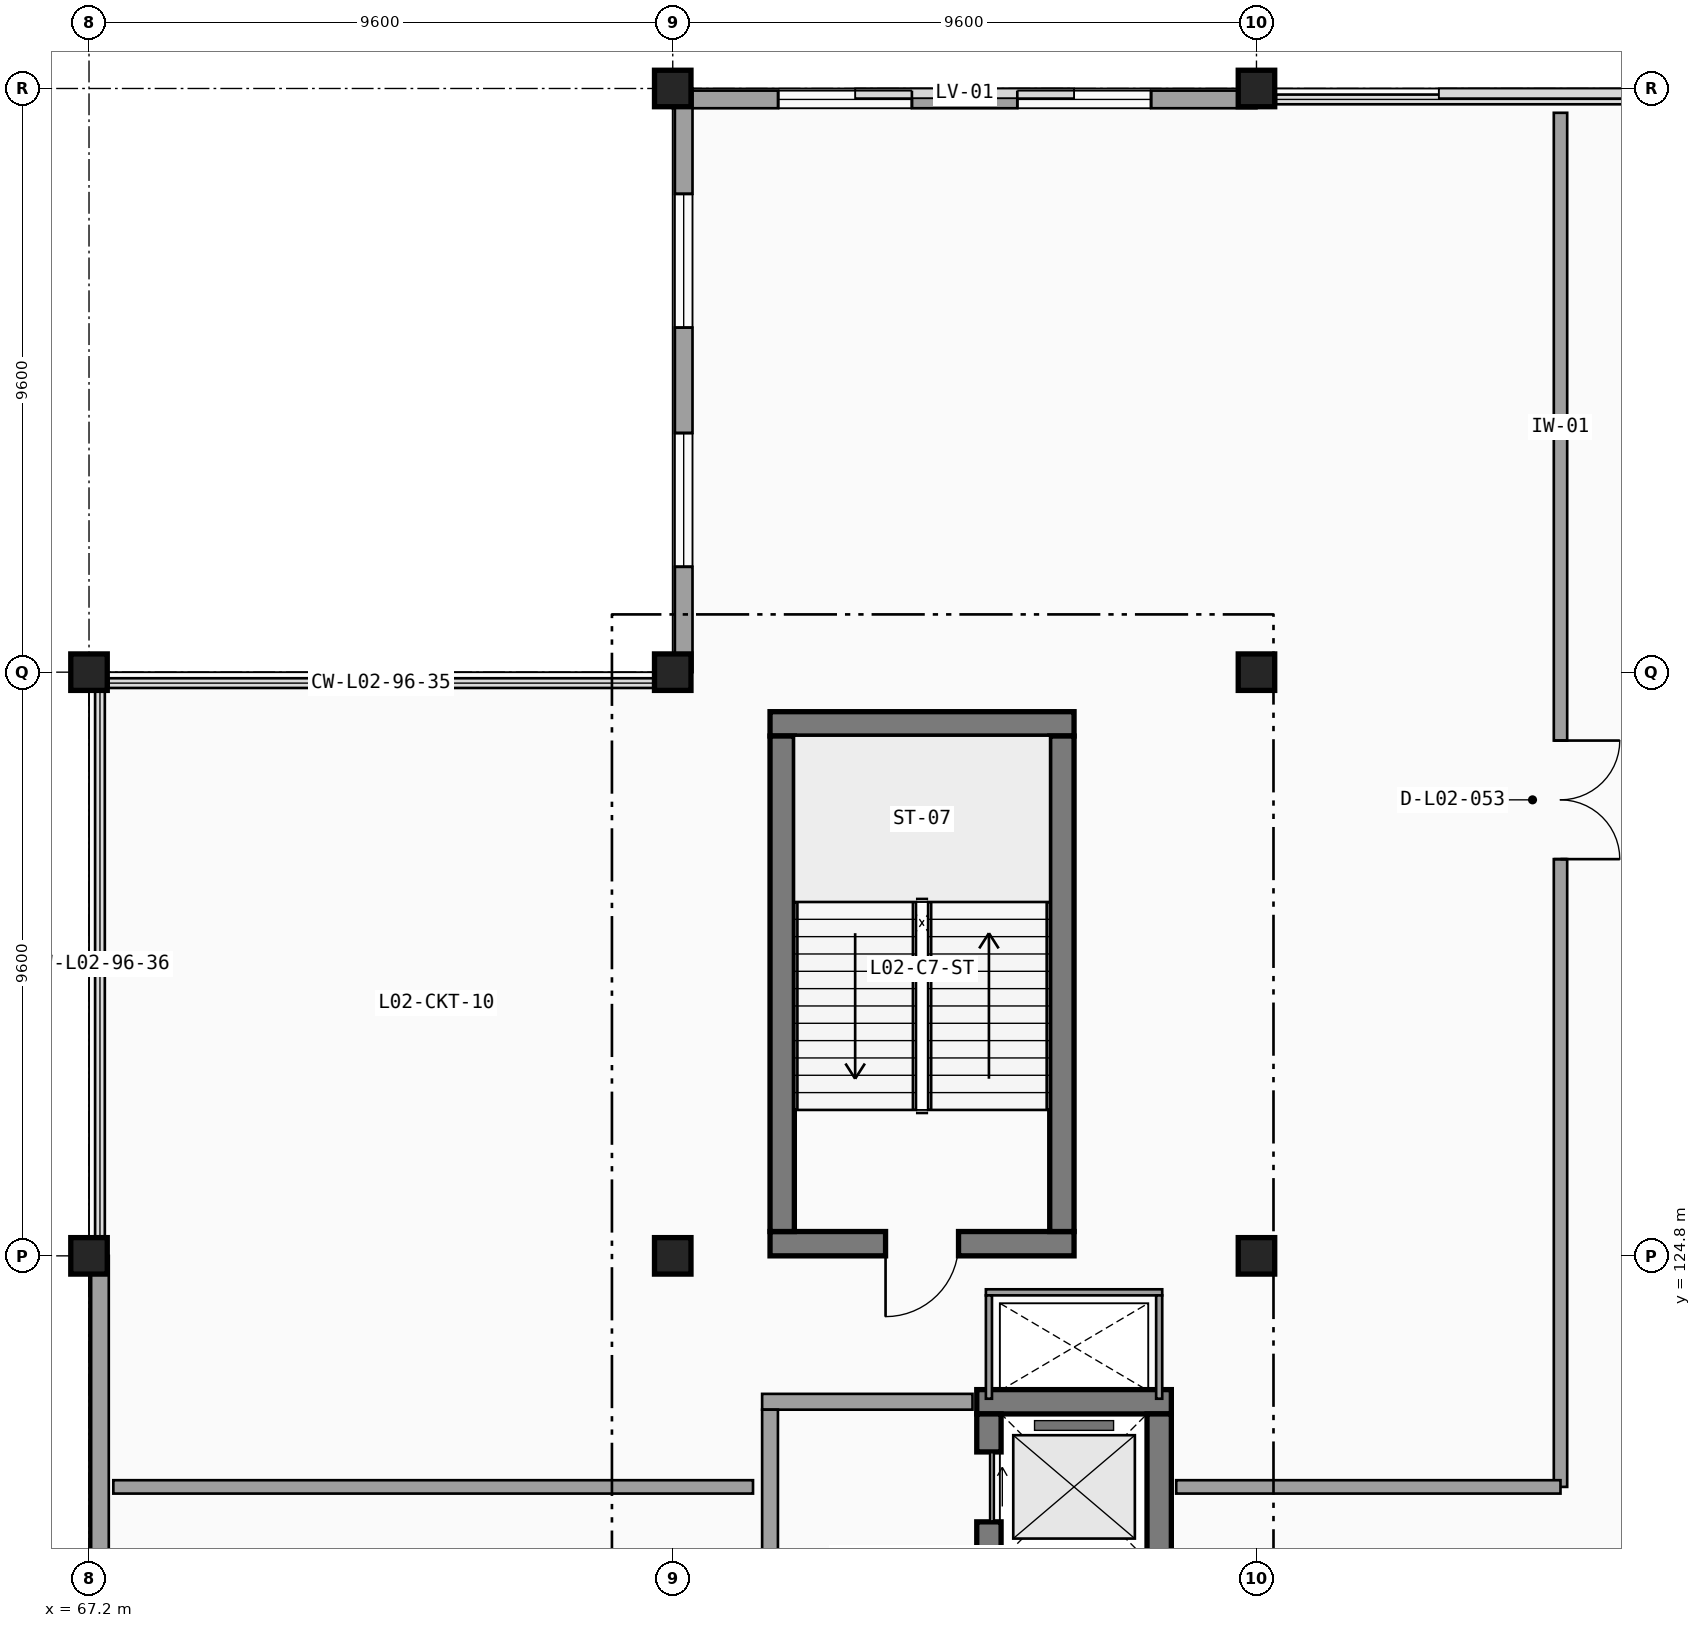
"""IFC4 building model, lengths in metres.
Left out: names, types, materials, properties, quantities, classifications, styles, units other than length and angle.
Written with IfcOpenShell. Run it as: python <this file> out.ifc"""

import sys

from ifc_helpers import new_model, si_unit, direction, frame, frame_2d, origin, origin_2d, place, context, subcontext, project, spatial, rectangle, extrude, element, fill, save


model = new_model("IFC4")
c1 = context("Model", 3, precision=1e-05, world=origin(), true_north=direction((0.0, 1.0)))
c2 = subcontext(c1, "Body", "Model", "MODEL_VIEW")
j1 = project(units=[si_unit("LENGTHUNIT", "METRE"), si_unit("PLANEANGLEUNIT", "RADIAN")], contexts=[c1])
p1 = place(None, origin())
s1 = spatial("IfcSite", under=j1, at=p1, CompositionType="ELEMENT")
p2 = place(p1, origin())
s2 = spatial("IfcBuilding", under=s1, at=p2, CompositionType="ELEMENT")
p3 = place(p2, frame((0.0, 0.0, 9.6)))
s3 = spatial("IfcBuildingStorey", under=s2, at=p3, CompositionType="ELEMENT", Elevation=9.6)
for number, where, z_axis, x_axis in (
    (1, (67.2, 124.8, 0.0), (0.0, 0.0, 1.0), (1.0, 0.0, 0.0)),
    (2, (67.2, 134.4, 0.0), (0.0, 0.0, 1.0), (1.0, 0.0, 0.0)),
    (3, (76.8, 124.8, 0.0), (0.0, 0.0, 1.0), (1.0, 0.0, 0.0)),
    (4, (76.8, 134.4, 0.0), (0.0, 0.0, 1.0), (1.0, 0.0, 0.0)),
    (5, (76.8, 144.0, 0.0), (0.0, 0.0, 1.0), (1.0, 0.0, 0.0)),
    (6, (86.4, 124.8, 0.0), (0.0, 0.0, 1.0), (1.0, 0.0, 0.0)),
    (7, (86.4, 134.4, 0.0), (0.0, 0.0, 1.0), (1.0, 0.0, 0.0)),
    (8, (86.4, 144.0, 0.0), (0.0, 0.0, 1.0), (1.0, 0.0, 0.0)),
):
    element("IfcColumn", number, at=place(p3, frame(where, z_axis=z_axis, x_axis=x_axis)), inside=s3, PredefinedType="COLUMN", context=c2, shape_type="SweptSolid", body=[
        extrude(rectangle(XDim=0.6, YDim=0.6, at=origin_2d()), origin(), (0.0, 0.0, 1.0), 4.5),
    ])
p4 = place(p3, frame((86.4, 143.82, 0.0), z_axis=(0.0, 0.0, 1.0), x_axis=(-1.0, 0.0, 0.0)))
e9 = element("IfcWall", 9, at=p4, inside=s3, PredefinedType="SOLIDWALL", context=c2, shape_type="SweptSolid", body=[
    extrude(rectangle(XDim=9.6, YDim=0.29, at=frame_2d((4.8, 0.0))), origin(), (0.0, 0.0, 1.0), 3.293),
])
p5 = place(p4, frame((3.933, 0.0, 0.95), z_axis=(0.0, 0.0, 1.0), x_axis=(-1.0, 0.0, 0.0)))
e10 = element("IfcOpeningElement", 10, at=p5, cuts=e9, PredefinedType="OPENING", context=c2, shape_type="SweptSolid", body=[
    extrude(rectangle(XDim=2.2, YDim=2.1, at=frame_2d((1.1, 1.05))), frame((0.0, 0.155, 0.0), z_axis=(0.0, -1.0, 0.0), x_axis=(1.0, 0.0, 0.0)), (0.0, 0.0, 1.0), 0.31),
])
p6 = place(p4, frame((7.867, 0.0, 0.95), z_axis=(0.0, 0.0, 1.0), x_axis=(-1.0, 0.0, 0.0)))
e11 = element("IfcOpeningElement", 11, at=p6, cuts=e9, PredefinedType="OPENING", context=c2, shape_type="SweptSolid", body=[
    extrude(rectangle(XDim=2.2, YDim=2.1, at=frame_2d((1.1, 1.05))), frame((0.0, 0.155, 0.0), z_axis=(0.0, -1.0, 0.0), x_axis=(1.0, 0.0, 0.0)), (0.0, 0.0, 1.0), 0.31),
])
p7 = place(p3, frame((76.98, 144.0, 0.0), z_axis=(0.0, 0.0, 1.0), x_axis=(0.0, -1.0, 0.0)))
e12 = element("IfcWall", 12, at=p7, inside=s3, PredefinedType="SOLIDWALL", context=c2, shape_type="SweptSolid", body=[
    extrude(rectangle(XDim=9.6, YDim=0.29, at=frame_2d((4.8, 0.0))), origin(), (0.0, 0.0, 1.0), 3.613),
])
p8 = place(p7, frame((3.933, 0.0, 0.95), z_axis=(0.0, 0.0, 1.0), x_axis=(-1.0, 0.0, 0.0)))
e13 = element("IfcOpeningElement", 13, at=p8, cuts=e12, PredefinedType="OPENING", context=c2, shape_type="SweptSolid", body=[
    extrude(rectangle(XDim=2.2, YDim=2.1, at=frame_2d((1.1, 1.05))), frame((0.0, 0.155, 0.0), z_axis=(0.0, -1.0, 0.0), x_axis=(1.0, 0.0, 0.0)), (0.0, 0.0, 1.0), 0.31),
])
p9 = place(p7, frame((7.867, 0.0, 0.95), z_axis=(0.0, 0.0, 1.0), x_axis=(-1.0, 0.0, 0.0)))
e14 = element("IfcOpeningElement", 14, at=p9, cuts=e12, PredefinedType="OPENING", context=c2, shape_type="SweptSolid", body=[
    extrude(rectangle(XDim=2.2, YDim=2.1, at=frame_2d((1.1, 1.05))), frame((0.0, 0.155, 0.0), z_axis=(0.0, -1.0, 0.0), x_axis=(1.0, 0.0, 0.0)), (0.0, 0.0, 1.0), 0.31),
])
p10 = place(p3, frame((67.38, 124.8, 0.0), z_axis=(0.0, 0.0, 1.0), x_axis=(0.0, -1.0, 0.0)))
e15 = element("IfcWall", 15, at=p10, inside=s3, PredefinedType="SOLIDWALL", context=c2, shape_type="SweptSolid", body=[
    extrude(rectangle(XDim=9.6, YDim=0.29, at=frame_2d((4.8, 0.0))), origin(), (0.0, 0.0, 1.0), 3.613),
])
p11 = place(p10, frame((7.867, 0.0, 0.95), z_axis=(0.0, 0.0, 1.0), x_axis=(-1.0, 0.0, 0.0)))
e16 = element("IfcOpeningElement", 16, at=p11, cuts=e15, PredefinedType="OPENING", context=c2, shape_type="SweptSolid", body=[
    extrude(rectangle(XDim=2.2, YDim=2.1, at=frame_2d((1.1, 1.05))), frame((0.0, 0.155, 0.0), z_axis=(0.0, -1.0, 0.0), x_axis=(1.0, 0.0, 0.0)), (0.0, 0.0, 1.0), 0.31),
])
p12 = place(p3, frame((78.4, 125.0, 0.0), z_axis=(0.0, 0.0, 1.0), x_axis=(1.0, 0.0, 0.0)))
e17 = element("IfcWall", 17, at=p12, inside=s3, PredefinedType="SHEAR", context=c2, shape_type="SweptSolid", body=[
    extrude(rectangle(XDim=5.0, YDim=0.4, at=frame_2d((2.5, 0.0))), origin(), (0.0, 0.0, 1.0), 4.22),
])
p13 = place(p12, frame((3.1, 0.0, 0.0), z_axis=(0.0, 0.0, 1.0), x_axis=(-1.0, 0.0, 0.0)))
e18 = element("IfcOpeningElement", 18, at=p13, cuts=e17, PredefinedType="OPENING", context=c2, shape_type="SweptSolid", body=[
    extrude(rectangle(XDim=1.2, YDim=2.2, at=frame_2d((0.6, 1.1))), frame((0.0, 0.21, 0.0), z_axis=(0.0, -1.0, 0.0), x_axis=(1.0, 0.0, 0.0)), (0.0, 0.0, 1.0), 0.42),
])
p14 = place(p3, frame((83.4, 133.55, 0.0), z_axis=(0.0, 0.0, 1.0), x_axis=(-1.0, 0.0, 0.0)))
e19 = element("IfcWall", 19, at=p14, inside=s3, PredefinedType="SHEAR", context=c2, shape_type="SweptSolid", body=[
    extrude(rectangle(XDim=5.0, YDim=0.4, at=frame_2d((2.5, 0.0))), origin(), (0.0, 0.0, 1.0), 4.22),
])
for number, where, z_axis, x_axis in (
    (20, (78.6, 133.35, 0.0), (0.0, 0.0, 1.0), (0.0, -1.0, 0.0)),
    (21, (83.2, 125.2, 0.0), (0.0, 0.0, 1.0), (0.0, 1.0, 0.0)),
):
    element("IfcWall", number, at=place(p3, frame(where, z_axis=z_axis, x_axis=x_axis)), inside=s3, PredefinedType="SHEAR", context=c2, shape_type="SweptSolid", body=[
        extrude(rectangle(XDim=8.15, YDim=0.4, at=frame_2d((4.075, 0.0))), origin(), (0.0, 0.0, 1.0), 4.22),
    ])
p15 = place(p3, frame((85.0, 122.4, 0.0), z_axis=(0.0, 0.0, 1.0), x_axis=(-1.0, 0.0, 0.0)))
e22 = element("IfcWall", 22, at=p15, inside=s3, PredefinedType="SHEAR", context=c2, shape_type="SweptSolid", body=[
    extrude(rectangle(XDim=3.2, YDim=0.4, at=frame_2d((1.6, 0.0))), origin(), (0.0, 0.0, 1.0), 4.22),
])
p16 = place(p3, frame((82.0, 122.2, 0.0), z_axis=(0.0, 0.0, 1.0), x_axis=(0.0, -1.0, 0.0)))
e23 = element("IfcWall", 23, at=p16, inside=s3, PredefinedType="SHEAR", context=c2, shape_type="SweptSolid", body=[
    extrude(rectangle(XDim=2.4, YDim=0.4, at=frame_2d((1.2, 0.0))), origin(), (0.0, 0.0, 1.0), 4.22),
])
p17 = place(p16, frame((0.625, 0.0, 0.0), z_axis=(0.0, 0.0, 1.0), x_axis=(1.0, 0.0, 0.0)))
e24 = element("IfcOpeningElement", 24, at=p17, cuts=e23, PredefinedType="OPENING", context=c2, shape_type="SweptSolid", body=[
    extrude(rectangle(XDim=1.15, YDim=2.2, at=frame_2d((0.575, 1.1))), frame((0.0, 0.21, 0.0), z_axis=(0.0, -1.0, 0.0), x_axis=(1.0, 0.0, 0.0)), (0.0, 0.0, 1.0), 0.42),
])
p18 = place(p3, frame((84.8, 119.8, 0.0), z_axis=(0.0, 0.0, 1.0), x_axis=(0.0, 1.0, 0.0)))
e25 = element("IfcWall", 25, at=p18, inside=s3, PredefinedType="SHEAR", context=c2, shape_type="SweptSolid", body=[
    extrude(rectangle(XDim=2.4, YDim=0.4, at=frame_2d((1.2, 0.0))), origin(), (0.0, 0.0, 1.0), 4.22),
])
p19 = place(p3, frame((84.85, 124.2, 0.0), z_axis=(0.0, 0.0, 1.0), x_axis=(-1.0, 0.0, 0.0)))
e26 = element("IfcWall", 26, at=p19, inside=s3, PredefinedType="PARTITIONING", context=c2, shape_type="SweptSolid", body=[
    extrude(rectangle(XDim=2.9, YDim=0.1, at=frame_2d((1.45, 0.0))), origin(), (0.0, 0.0, 1.0), 4.22),
])
for number, where, z_axis, x_axis in (
    (27, (82.0, 124.15, 0.0), (0.0, 0.0, 1.0), (0.0, -1.0, 0.0)),
    (28, (84.8, 122.45, 0.0), (0.0, 0.0, 1.0), (0.0, 1.0, 0.0)),
):
    element("IfcWall", number, at=place(p3, frame(where, z_axis=z_axis, x_axis=x_axis)), inside=s3, PredefinedType="PARTITIONING", context=c2, shape_type="SweptSolid", body=[
        extrude(rectangle(XDim=1.7, YDim=0.1, at=frame_2d((0.85, 0.0))), origin(), (0.0, 0.0, 1.0), 4.22),
    ])
p20 = place(p3, frame((81.73, 122.4, 0.0), z_axis=(0.0, 0.0, 1.0), x_axis=(-1.0, 0.0, 0.0)))
e29 = element("IfcWall", 29, at=p20, inside=s3, PredefinedType="SOLIDWALL", context=c2, shape_type="SweptSolid", body=[
    extrude(rectangle(XDim=3.46, YDim=0.26, at=frame_2d((1.73, 0.0))), origin(), (0.0, 0.0, 1.0), 4.22),
])
p21 = place(p3, frame((78.4, 122.27, 0.0), z_axis=(0.0, 0.0, 1.0), x_axis=(0.0, -1.0, 0.0)))
e30 = element("IfcWall", 30, at=p21, inside=s3, PredefinedType="SOLIDWALL", context=c2, shape_type="SweptSolid", body=[
    extrude(rectangle(XDim=5.34, YDim=0.26, at=frame_2d((2.67, 0.0))), origin(), (0.0, 0.0, 1.0), 4.22),
])
p22 = place(p3, frame((91.4, 143.6, 0.0), z_axis=(0.0, 0.0, 1.0), x_axis=(0.0, -1.0, 0.0)))
e31 = element("IfcWall", 31, at=p22, inside=s3, PredefinedType="PARTITIONING", context=c2, shape_type="SweptSolid", body=[
    extrude(rectangle(XDim=22.6, YDim=0.22, at=frame_2d((11.3, 0.0))), origin(), (0.0, 0.0, 1.0), 3.466),
])
p23 = place(p22, frame((10.325, 0.0, 0.0), z_axis=(0.0, 0.0, 1.0), x_axis=(1.0, 0.0, 0.0)))
e32 = element("IfcOpeningElement", 32, at=p23, cuts=e31, PredefinedType="OPENING", context=c2, shape_type="SweptSolid", body=[
    extrude(rectangle(XDim=1.95, YDim=2.35, at=frame_2d((0.975, 1.175))), frame((0.0, 0.12, 0.0), z_axis=(0.0, -1.0, 0.0), x_axis=(1.0, 0.0, 0.0)), (0.0, 0.0, 1.0), 0.24),
])
p24 = place(p3, frame((91.4, 121.0, 0.0), z_axis=(0.0, 0.0, 1.0), x_axis=(-1.0, 0.0, 0.0)))
e33 = element("IfcWall", 33, at=p24, inside=s3, PredefinedType="PARTITIONING", context=c2, shape_type="SweptSolid", body=[
    extrude(rectangle(XDim=6.32, YDim=0.22, at=frame_2d((3.16, 0.0))), origin(), (0.0, 0.0, 1.0), 3.613),
])
p25 = place(p3, frame((78.12, 121.0, 0.0), z_axis=(0.0, 0.0, 1.0), x_axis=(-1.0, 0.0, 0.0)))
e34 = element("IfcWall", 34, at=p25, inside=s3, PredefinedType="PARTITIONING", context=c2, shape_type="SweptSolid", body=[
    extrude(rectangle(XDim=10.52, YDim=0.22, at=frame_2d((5.26, 0.0))), origin(), (0.0, 0.0, 1.0), 3.613),
])
p26 = place(p5, origin())
e35 = element("IfcWindow", 35, at=p26, inside=s3, PartitioningType="SINGLE_PANEL", PredefinedType="WINDOW", context=c2, shape_type="SweptSolid", body=[
    extrude(rectangle(XDim=2.2, YDim=2.1, at=frame_2d((1.1, 1.05))), frame((0.0, 0.03, 0.0), z_axis=(0.0, -1.0, 0.0), x_axis=(1.0, 0.0, 0.0)), (0.0, 0.0, 1.0), 0.06),
])
fill(e10, e35)
p27 = place(p6, origin())
e36 = element("IfcWindow", 36, at=p27, inside=s3, PartitioningType="SINGLE_PANEL", PredefinedType="WINDOW", context=c2, shape_type="SweptSolid", body=[
    extrude(rectangle(XDim=2.2, YDim=2.1, at=frame_2d((1.1, 1.05))), frame((0.0, 0.03, 0.0), z_axis=(0.0, -1.0, 0.0), x_axis=(1.0, 0.0, 0.0)), (0.0, 0.0, 1.0), 0.06),
])
fill(e11, e36)
p28 = place(p8, origin())
e37 = element("IfcWindow", 37, at=p28, inside=s3, PartitioningType="SINGLE_PANEL", PredefinedType="WINDOW", context=c2, shape_type="SweptSolid", body=[
    extrude(rectangle(XDim=2.2, YDim=2.1, at=frame_2d((1.1, 1.05))), frame((0.0, 0.03, 0.0), z_axis=(0.0, -1.0, 0.0), x_axis=(1.0, 0.0, 0.0)), (0.0, 0.0, 1.0), 0.06),
])
fill(e13, e37)
p29 = place(p9, origin())
e38 = element("IfcWindow", 38, at=p29, inside=s3, PartitioningType="SINGLE_PANEL", PredefinedType="WINDOW", context=c2, shape_type="SweptSolid", body=[
    extrude(rectangle(XDim=2.2, YDim=2.1, at=frame_2d((1.1, 1.05))), frame((0.0, 0.03, 0.0), z_axis=(0.0, -1.0, 0.0), x_axis=(1.0, 0.0, 0.0)), (0.0, 0.0, 1.0), 0.06),
])
fill(e14, e38)
p30 = place(p13, origin())
e39 = element("IfcDoor", 39, at=p30, inside=s3, OperationType="SINGLE_SWING_RIGHT", PredefinedType="DOOR", context=c2, shape_type="SweptSolid", body=[
    extrude(rectangle(XDim=1.2, YDim=2.2, at=frame_2d((0.6, 1.1))), frame((0.0, 0.025, 0.0), z_axis=(0.0, -1.0, 0.0), x_axis=(1.0, 0.0, 0.0)), (0.0, 0.0, 1.0), 0.05),
])
fill(e18, e39)
p31 = place(p17, origin())
e40 = element("IfcDoor", 40, at=p31, inside=s3, OperationType="SLIDING_TO_LEFT", PredefinedType="DOOR", context=c2, shape_type="SweptSolid", body=[
    extrude(rectangle(XDim=1.15, YDim=2.2, at=frame_2d((0.575, 1.1))), frame((0.0, 0.025, 0.0), z_axis=(0.0, -1.0, 0.0), x_axis=(1.0, 0.0, 0.0)), (0.0, 0.0, 1.0), 0.05),
])
fill(e24, e40)
p32 = place(p23, origin())
e41 = element("IfcDoor", 41, at=p32, inside=s3, OperationType="DOUBLE_DOOR_SINGLE_SWING", PredefinedType="DOOR", context=c2, shape_type="SweptSolid", body=[
    extrude(rectangle(XDim=1.95, YDim=2.35, at=frame_2d((0.975, 1.175))), frame((0.0, 0.025, 0.0), z_axis=(0.0, -1.0, 0.0), x_axis=(1.0, 0.0, 0.0)), (0.0, 0.0, 1.0), 0.05),
])
fill(e32, e41)
save(model, sys.argv[1])
